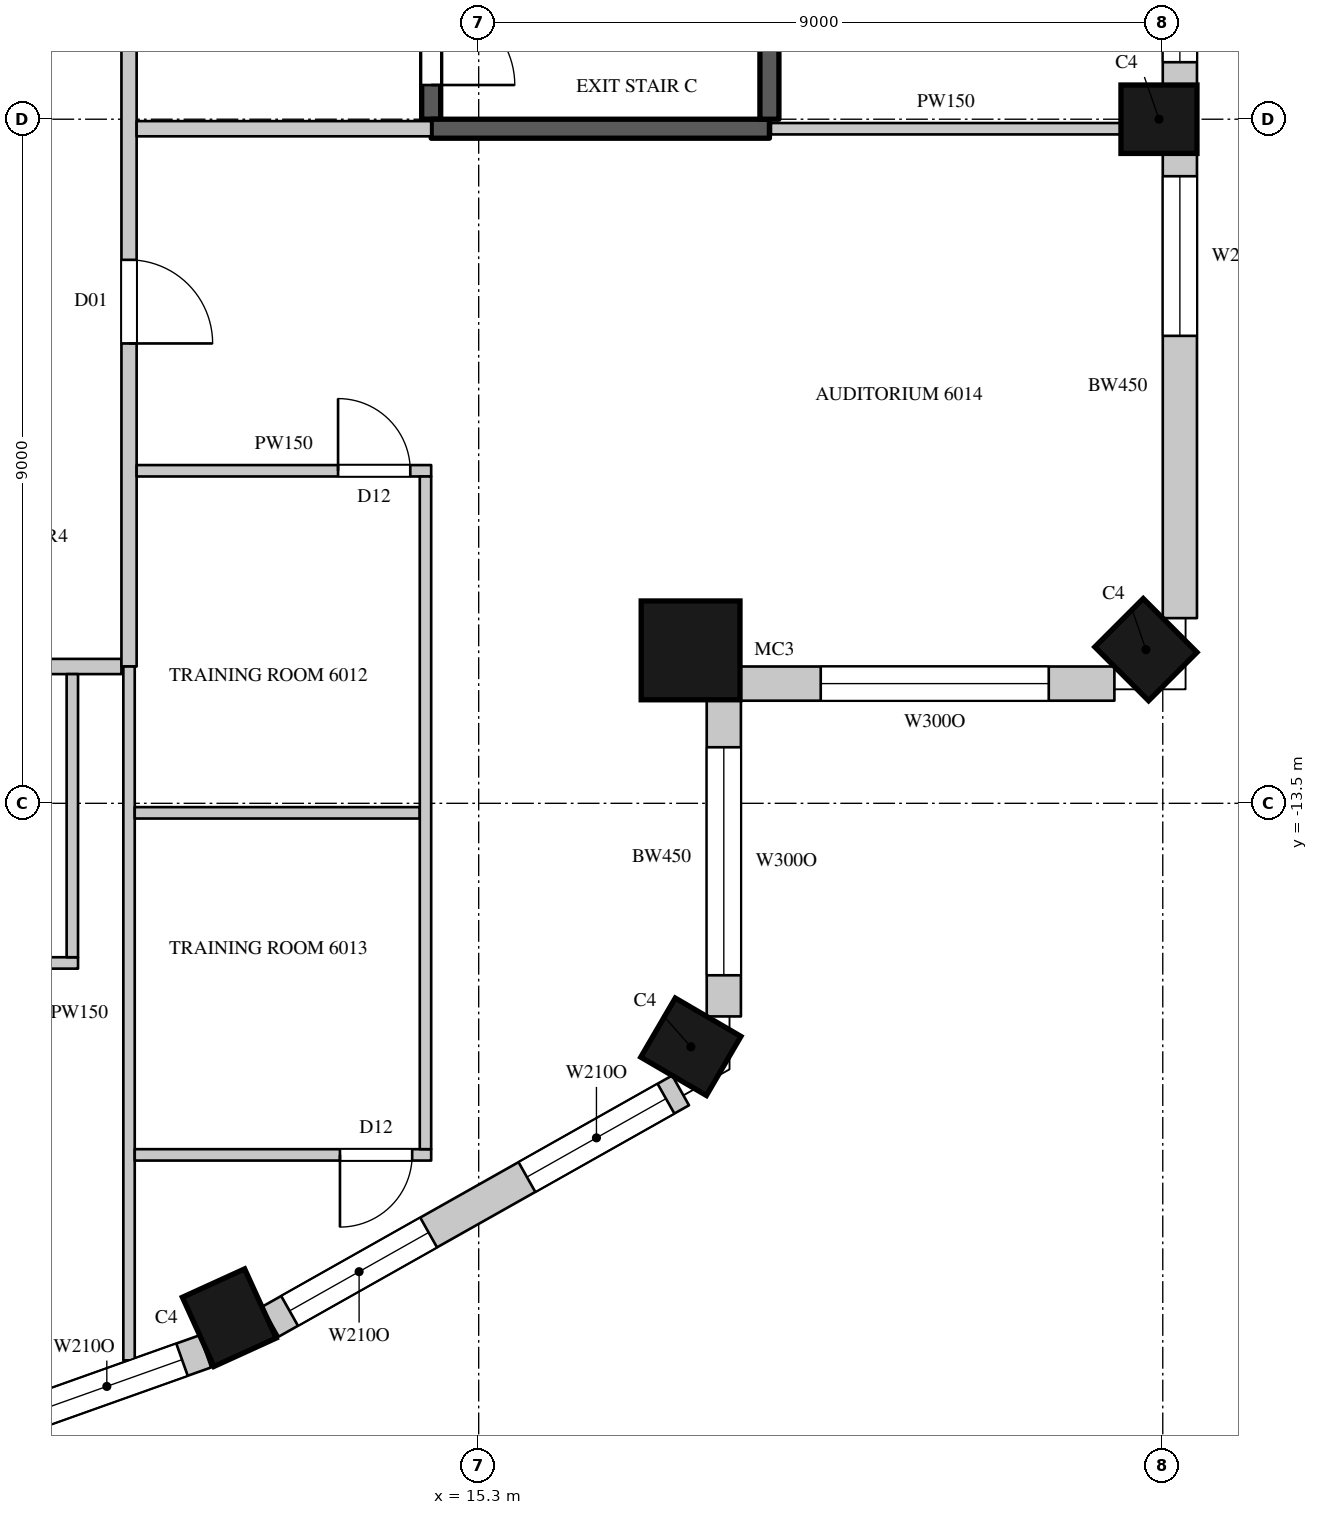
"""IFC4 building model, lengths in metres.
Left out: names, types, materials, properties, quantities, classifications, styles, units other than length and angle.
Written with IfcOpenShell. Run it as: python <this file> out.ifc"""

import sys

from ifc_helpers import new_model, si_unit, direction, frame, frame_2d, origin, origin_2d, place, context, subcontext, project, spatial, rectangle, circle, extrude, element, fill, save


model = new_model("IFC4")
c1 = context("Model", 3, precision=1e-05, world=origin(), true_north=direction((0.0, 1.0)))
c2 = subcontext(c1, "Body", "Model", "MODEL_VIEW")
j1 = project(units=[si_unit("LENGTHUNIT", "METRE"), si_unit("PLANEANGLEUNIT", "RADIAN")], contexts=[c1])
p1 = place(None, origin())
s1 = spatial("IfcSite", under=j1, at=p1, CompositionType="ELEMENT")
p2 = place(p1, origin())
s2 = spatial("IfcBuilding", under=s1, at=p2, CompositionType="ELEMENT")
p3 = place(p2, frame((0.0, 0.0, 268.0)))
s3 = spatial("IfcBuildingStorey", under=s2, at=p3, CompositionType="ELEMENT", Elevation=268.0)
for number, where, z_axis, x_axis in (
    (1, (12.019, -20.267, 0.0), (0.0, 0.0, 1.0), (0.91, 0.415, 0.0)),
    (2, (18.091, -16.703, 0.0), (0.0, 0.0, 1.0), (0.504, 0.863, 0.0)),
):
    element("IfcColumn", number, at=place(p3, frame(where, z_axis=z_axis, x_axis=x_axis)), inside=s3, PredefinedType="COLUMN", context=c2, shape_type="SweptSolid", body=[
        extrude(rectangle(XDim=0.9, YDim=1.0, at=origin_2d()), origin(), (0.0, 0.0, 1.0), 4.1),
    ])
p4 = place(p3, frame((18.088, -11.488, 0.0), z_axis=(0.0, 0.0, 1.0), x_axis=(1.0, 0.0, 0.0)))
e3 = element("IfcColumn", 3, at=p4, inside=s3, PredefinedType="COLUMN", context=c2, shape_type="SweptSolid", body=[
    extrude(circle(Radius=0.65, at=origin_2d()), origin(), (0.0, 0.0, 1.0), 4.1),
])
for number, where, z_axis, x_axis in (
    (4, (24.078, -11.478, 0.0), (0.0, 0.0, 1.0), (0.707, 0.707, 0.0)),
    (5, (24.25, -4.5, 0.0), (0.0, 0.0, 1.0), (0.0, 1.0, 0.0)),
):
    element("IfcColumn", number, at=place(p3, frame(where, z_axis=z_axis, x_axis=x_axis)), inside=s3, PredefinedType="COLUMN", context=c2, shape_type="SweptSolid", body=[
        extrude(rectangle(XDim=0.9, YDim=1.0, at=origin_2d()), origin(), (0.0, 0.0, 1.0), 4.1),
    ])
p5 = place(p3, frame((5.665, -22.859, 0.0), z_axis=(0.0, 0.0, 1.0), x_axis=(0.942108340262, 0.335308626803, 0.0)))
e6 = element("IfcWall", 6, at=p5, inside=s3, PredefinedType="SOLIDWALL", context=c2, shape_type="SweptSolid", body=[
    extrude(rectangle(XDim=6.412, YDim=0.45, at=frame_2d((3.206, 0.0))), origin(), (0.0, 0.0, 1.0), 3.8),
])
p6 = place(p5, frame((0.327, 0.0, 1.05)))
e7 = element("IfcOpeningElement", 7, at=p6, cuts=e6, PredefinedType="OPENING", context=c2, shape_type="SweptSolid", body=[
    extrude(rectangle(XDim=2.1, YDim=2.4, at=frame_2d((1.05, 1.2))), frame((0.0, 0.235, 0.0), z_axis=(0.0, -1.0, 0.0), x_axis=(1.0, 0.0, 0.0)), (0.0, 0.0, 1.0), 0.47),
])
p7 = place(p5, frame((3.985, 0.0, 1.05)))
e8 = element("IfcOpeningElement", 8, at=p7, cuts=e6, PredefinedType="OPENING", context=c2, shape_type="SweptSolid", body=[
    extrude(rectangle(XDim=2.1, YDim=2.4, at=frame_2d((1.05, 1.2))), frame((0.0, 0.235, 0.0), z_axis=(0.0, -1.0, 0.0), x_axis=(1.0, 0.0, 0.0)), (0.0, 0.0, 1.0), 0.47),
])
p8 = place(p3, frame((12.559, -20.32, 0.0), z_axis=(0.0, 0.0, 1.0), x_axis=(0.871065783524, 0.491166367714, 0.0)))
e9 = element("IfcWall", 9, at=p8, inside=s3, PredefinedType="SOLIDWALL", context=c2, shape_type="SweptSolid", body=[
    extrude(rectangle(XDim=6.196, YDim=0.45, at=frame_2d((3.098, 0.0))), origin(), (0.0, 0.0, 1.0), 3.8),
])
p9 = place(p8, frame((0.291, 0.0, 1.05)))
e10 = element("IfcOpeningElement", 10, at=p9, cuts=e9, PredefinedType="OPENING", context=c2, shape_type="SweptSolid", body=[
    extrude(rectangle(XDim=2.1, YDim=2.4, at=frame_2d((1.05, 1.2))), frame((0.0, 0.235, 0.0), z_axis=(0.0, -1.0, 0.0), x_axis=(1.0, 0.0, 0.0)), (0.0, 0.0, 1.0), 0.47),
])
p10 = place(p8, frame((3.875, 0.0, 1.05)))
e11 = element("IfcOpeningElement", 11, at=p10, cuts=e9, PredefinedType="OPENING", context=c2, shape_type="SweptSolid", body=[
    extrude(rectangle(XDim=2.1, YDim=2.4, at=frame_2d((1.05, 1.2))), frame((0.0, 0.235, 0.0), z_axis=(0.0, -1.0, 0.0), x_axis=(1.0, 0.0, 0.0)), (0.0, 0.0, 1.0), 0.47),
])
p11 = place(p3, frame((18.525, -16.304, 0.0), z_axis=(0.0, 0.0, 1.0), x_axis=(0.0, 1.0, 0.0)))
e12 = element("IfcWall", 12, at=p11, inside=s3, PredefinedType="SOLIDWALL", context=c2, shape_type="SweptSolid", body=[
    extrude(rectangle(XDim=4.202, YDim=0.45, at=frame_2d((2.101, 0.0))), origin(), (0.0, 0.0, 1.0), 3.8),
])
p12 = place(p11, frame((0.541, 0.0, 1.05)))
e13 = element("IfcOpeningElement", 13, at=p12, cuts=e12, PredefinedType="OPENING", context=c2, shape_type="SweptSolid", body=[
    extrude(rectangle(XDim=3.0, YDim=2.4, at=frame_2d((1.5, 1.2))), frame((0.0, 0.235, 0.0), z_axis=(0.0, -1.0, 0.0), x_axis=(1.0, 0.0, 0.0)), (0.0, 0.0, 1.0), 0.47),
])
p13 = place(p3, frame((18.701, -11.925, 0.0), z_axis=(0.0, 0.0, 1.0), x_axis=(1.0, 0.0, 0.0)))
e14 = element("IfcWall", 14, at=p13, inside=s3, PredefinedType="SOLIDWALL", context=c2, shape_type="SweptSolid", body=[
    extrude(rectangle(XDim=4.962, YDim=0.45, at=frame_2d((2.481, 0.0))), origin(), (0.0, 0.0, 1.0), 3.8),
])
p14 = place(p13, frame((1.098, 0.0, 1.05)))
e15 = element("IfcOpeningElement", 15, at=p14, cuts=e14, PredefinedType="OPENING", context=c2, shape_type="SweptSolid", body=[
    extrude(rectangle(XDim=3.0, YDim=2.4, at=frame_2d((1.5, 1.2))), frame((0.0, 0.235, 0.0), z_axis=(0.0, -1.0, 0.0), x_axis=(1.0, 0.0, 0.0)), (0.0, 0.0, 1.0), 0.47),
])
p15 = place(p3, frame((24.525, -11.064, 0.0), z_axis=(0.0, 0.0, 1.0), x_axis=(0.0, 1.0, 0.0)))
e16 = element("IfcWall", 16, at=p15, inside=s3, PredefinedType="SOLIDWALL", context=c2, shape_type="SweptSolid", body=[
    extrude(rectangle(XDim=6.114, YDim=0.45, at=frame_2d((3.057, 0.0))), origin(), (0.0, 0.0, 1.0), 3.8),
])
p16 = place(p15, frame((3.714, 0.0, 1.05)))
e17 = element("IfcOpeningElement", 17, at=p16, cuts=e16, PredefinedType="OPENING", context=c2, shape_type="SweptSolid", body=[
    extrude(rectangle(XDim=2.1, YDim=2.4, at=frame_2d((1.05, 1.2))), frame((0.0, 0.235, 0.0), z_axis=(0.0, -1.0, 0.0), x_axis=(1.0, 0.0, 0.0)), (0.0, 0.0, 1.0), 0.47),
])
p17 = place(p3, frame((24.525, -4.05, 0.0), z_axis=(0.0, 0.0, 1.0), x_axis=(0.0, 1.0, 0.0)))
e18 = element("IfcWall", 18, at=p17, inside=s3, PredefinedType="SOLIDWALL", context=c2, shape_type="SweptSolid", body=[
    extrude(rectangle(XDim=8.1, YDim=0.45, at=frame_2d((4.05, 0.0))), origin(), (0.0, 0.0, 1.0), 3.8),
])
p18 = place(p17, frame((0.3, 0.0, 1.05)))
e19 = element("IfcOpeningElement", 19, at=p18, cuts=e18, PredefinedType="OPENING", context=c2, shape_type="SweptSolid", body=[
    extrude(rectangle(XDim=3.0, YDim=2.4, at=frame_2d((1.5, 1.2))), frame((0.0, 0.235, 0.0), z_axis=(0.0, -1.0, 0.0), x_axis=(1.0, 0.0, 0.0)), (0.0, 0.0, 1.0), 0.47),
])
p19 = place(p17, frame((4.8, 0.0, 1.05)))
e20 = element("IfcOpeningElement", 20, at=p19, cuts=e18, PredefinedType="OPENING", context=c2, shape_type="SweptSolid", body=[
    extrude(rectangle(XDim=3.0, YDim=2.4, at=frame_2d((1.5, 1.2))), frame((0.0, 0.235, 0.0), z_axis=(0.0, -1.0, 0.0), x_axis=(1.0, 0.0, 0.0)), (0.0, 0.0, 1.0), 0.47),
])
p20 = place(p3, frame((-10.9, -11.7, 0.0), z_axis=(0.0, 0.0, 1.0), x_axis=(1.0, 0.0, 0.0)))
e21 = element("IfcWall", 21, at=p20, inside=s3, PredefinedType="PARTITIONING", context=c2, shape_type="SweptSolid", body=[
    extrude(rectangle(XDim=21.5, YDim=0.2, at=frame_2d((10.75, 0.0))), origin(), (0.0, 0.0, 1.0), 3.8),
])
p21 = place(p20, frame((0.95, 0.0, 0.0)))
e22 = element("IfcOpeningElement", 22, at=p21, cuts=e21, PredefinedType="OPENING", context=c2, shape_type="SweptSolid", body=[
    extrude(rectangle(XDim=0.95, YDim=2.2, at=frame_2d((0.475, 1.1))), frame((0.0, 0.11, 0.0), z_axis=(0.0, -1.0, 0.0), x_axis=(1.0, 0.0, 0.0)), (0.0, 0.0, 1.0), 0.22),
])
p22 = place(p20, frame((4.2, 0.0, 0.0)))
e23 = element("IfcOpeningElement", 23, at=p22, cuts=e21, PredefinedType="OPENING", context=c2, shape_type="SweptSolid", body=[
    extrude(rectangle(XDim=0.9, YDim=2.2, at=frame_2d((0.45, 1.1))), frame((0.0, 0.11, 0.0), z_axis=(0.0, -1.0, 0.0), x_axis=(1.0, 0.0, 0.0)), (0.0, 0.0, 1.0), 0.22),
])
p23 = place(p20, frame((6.85, 0.0, 0.0)))
e24 = element("IfcOpeningElement", 24, at=p23, cuts=e21, PredefinedType="OPENING", context=c2, shape_type="SweptSolid", body=[
    extrude(rectangle(XDim=1.1, YDim=2.4, at=frame_2d((0.55, 1.2))), frame((0.0, 0.11, 0.0), z_axis=(0.0, -1.0, 0.0), x_axis=(1.0, 0.0, 0.0)), (0.0, 0.0, 1.0), 0.22),
])
p24 = place(p20, frame((9.95, 0.0, 0.0)))
e25 = element("IfcOpeningElement", 25, at=p24, cuts=e21, PredefinedType="OPENING", context=c2, shape_type="SweptSolid", body=[
    extrude(rectangle(XDim=1.1, YDim=2.4, at=frame_2d((0.55, 1.2))), frame((0.0, 0.11, 0.0), z_axis=(0.0, -1.0, 0.0), x_axis=(1.0, 0.0, 0.0)), (0.0, 0.0, 1.0), 0.22),
])
p25 = place(p3, frame((10.7, -11.7, 0.0), z_axis=(0.0, 0.0, 1.0), x_axis=(0.0, 1.0, 0.0)))
e26 = element("IfcWall", 26, at=p25, inside=s3, PredefinedType="PARTITIONING", context=c2, shape_type="SweptSolid", body=[
    extrude(rectangle(XDim=23.8, YDim=0.2, at=frame_2d((11.9, 0.0))), origin(), (0.0, 0.0, 1.0), 3.8),
])
p26 = place(p25, frame((12.35, 0.0, 0.0)))
e27 = element("IfcOpeningElement", 27, at=p26, cuts=e26, PredefinedType="OPENING", context=c2, shape_type="SweptSolid", body=[
    extrude(rectangle(XDim=1.5, YDim=2.4, at=frame_2d((0.75, 1.2))), frame((0.0, 0.11, 0.0), z_axis=(0.0, -1.0, 0.0), x_axis=(1.0, 0.0, 0.0)), (0.0, 0.0, 1.0), 0.22),
])
p27 = place(p25, frame((19.55, 0.0, 0.0)))
e28 = element("IfcOpeningElement", 28, at=p27, cuts=e26, PredefinedType="OPENING", context=c2, shape_type="SweptSolid", body=[
    extrude(rectangle(XDim=1.1, YDim=2.4, at=frame_2d((0.55, 1.2))), frame((0.0, 0.11, 0.0), z_axis=(0.0, -1.0, 0.0), x_axis=(1.0, 0.0, 0.0)), (0.0, 0.0, 1.0), 0.22),
])
p28 = place(p25, frame((4.25, 0.0, 0.0)))
e29 = element("IfcOpeningElement", 29, at=p28, cuts=e26, PredefinedType="OPENING", context=c2, shape_type="SweptSolid", body=[
    extrude(rectangle(XDim=1.1, YDim=2.4, at=frame_2d((0.55, 1.2))), frame((0.0, 0.11, 0.0), z_axis=(0.0, -1.0, 0.0), x_axis=(1.0, 0.0, 0.0)), (0.0, 0.0, 1.0), 0.22),
])
p29 = place(p3, frame((10.8, -4.625, 0.0), z_axis=(0.0, 0.0, 1.0), x_axis=(1.0, 0.0, 0.0)))
e30 = element("IfcWall", 30, at=p29, inside=s3, PredefinedType="PARTITIONING", context=c2, shape_type="SweptSolid", body=[
    extrude(rectangle(XDim=3.875, YDim=0.2, at=frame_2d((1.938, 0.0))), origin(), (0.0, 0.0, 1.0), 3.8),
])
p30 = place(p3, frame((2.379, -15.6, 0.0), z_axis=(0.0, 0.0, 1.0), x_axis=(1.0, 0.0, 0.0)))
e31 = element("IfcWall", 31, at=p30, inside=s3, PredefinedType="PARTITIONING", context=c2, shape_type="SweptSolid", body=[
    extrude(rectangle(XDim=7.65, YDim=0.15, at=frame_2d((3.825, 0.0))), origin(), (0.0, 0.0, 1.0), 3.8),
])
p31 = place(p30, frame((4.85, 0.0, 0.0)))
e32 = element("IfcOpeningElement", 32, at=p31, cuts=e31, PredefinedType="OPENING", context=c2, shape_type="SweptSolid", body=[
    extrude(rectangle(XDim=0.95, YDim=2.2, at=frame_2d((0.475, 1.1))), frame((0.0, 0.085, 0.0), z_axis=(0.0, -1.0, 0.0), x_axis=(1.0, 0.0, 0.0)), (0.0, 0.0, 1.0), 0.17),
])
p32 = place(p3, frame((9.954, -15.525, 0.0), z_axis=(0.0, 0.0, 1.0), x_axis=(0.0, 1.0, 0.0)))
e33 = element("IfcWall", 33, at=p32, inside=s3, PredefinedType="PARTITIONING", context=c2, shape_type="SweptSolid", body=[
    extrude(rectangle(XDim=3.725, YDim=0.15, at=frame_2d((1.862, 0.0))), origin(), (0.0, 0.0, 1.0), 3.8),
])
p33 = place(p3, frame((10.7, -20.828, 0.0), z_axis=(0.0, 0.0, 1.0), x_axis=(0.0, 1.0, 0.0)))
e34 = element("IfcWall", 34, at=p33, inside=s3, PredefinedType="PARTITIONING", context=c2, shape_type="SweptSolid", body=[
    extrude(rectangle(XDim=9.128, YDim=0.15, at=frame_2d((4.564, 0.0))), origin(), (0.0, 0.0, 1.0), 3.8),
])
p34 = place(p3, frame((10.775, -18.125, 0.0), z_axis=(0.0, 0.0, 1.0), x_axis=(1.0, 0.0, 0.0)))
e35 = element("IfcWall", 35, at=p34, inside=s3, PredefinedType="PARTITIONING", context=c2, shape_type="SweptSolid", body=[
    extrude(rectangle(XDim=3.9, YDim=0.15, at=frame_2d((1.95, 0.0))), origin(), (0.0, 0.0, 1.0), 3.8),
])
p35 = place(p34, frame((2.7, 0.0, 0.0)))
e36 = element("IfcOpeningElement", 36, at=p35, cuts=e35, PredefinedType="OPENING", context=c2, shape_type="SweptSolid", body=[
    extrude(rectangle(XDim=0.95, YDim=2.2, at=frame_2d((0.475, 1.1))), frame((0.0, 0.085, 0.0), z_axis=(0.0, -1.0, 0.0), x_axis=(1.0, 0.0, 0.0)), (0.0, 0.0, 1.0), 0.17),
])
p36 = place(p3, frame((10.775, -13.625, 0.0), z_axis=(0.0, 0.0, 1.0), x_axis=(1.0, 0.0, 0.0)))
e37 = element("IfcWall", 37, at=p36, inside=s3, PredefinedType="PARTITIONING", context=c2, shape_type="SweptSolid", body=[
    extrude(rectangle(XDim=3.75, YDim=0.15, at=frame_2d((1.875, 0.0))), origin(), (0.0, 0.0, 1.0), 3.8),
])
p37 = place(p3, frame((10.8, -9.125, 0.0), z_axis=(0.0, 0.0, 1.0), x_axis=(1.0, 0.0, 0.0)))
e38 = element("IfcWall", 38, at=p37, inside=s3, PredefinedType="PARTITIONING", context=c2, shape_type="SweptSolid", body=[
    extrude(rectangle(XDim=3.875, YDim=0.15, at=frame_2d((1.938, 0.0))), origin(), (0.0, 0.0, 1.0), 3.8),
])
p38 = place(p37, frame((2.65, 0.0, 0.0)))
e39 = element("IfcOpeningElement", 39, at=p38, cuts=e38, PredefinedType="OPENING", context=c2, shape_type="SweptSolid", body=[
    extrude(rectangle(XDim=0.95, YDim=2.2, at=frame_2d((0.475, 1.1))), frame((0.0, 0.085, 0.0), z_axis=(0.0, -1.0, 0.0), x_axis=(1.0, 0.0, 0.0)), (0.0, 0.0, 1.0), 0.17),
])
p39 = place(p3, frame((14.6, -18.05, 0.0), z_axis=(0.0, 0.0, 1.0), x_axis=(0.0, 1.0, 0.0)))
e40 = element("IfcWall", 40, at=p39, inside=s3, PredefinedType="PARTITIONING", context=c2, shape_type="SweptSolid", body=[
    extrude(rectangle(XDim=8.85, YDim=0.15, at=frame_2d((4.425, 0.0))), origin(), (0.0, 0.0, 1.0), 3.8),
])
p40 = place(p3, frame((19.145, -4.625, 0.0), z_axis=(0.0, 0.0, 1.0), x_axis=(1.0, 0.0, 0.0)))
e41 = element("IfcWall", 41, at=p40, inside=s3, PredefinedType="PARTITIONING", context=c2, shape_type="SweptSolid", body=[
    extrude(rectangle(XDim=4.605, YDim=0.15, at=frame_2d((2.302, 0.0))), origin(), (0.0, 0.0, 1.0), 3.8),
])
p41 = place(p3, frame((14.675, -4.5, 0.0), z_axis=(0.0, 0.0, 1.0), x_axis=(0.0, 1.0, 0.0)))
e42 = element("IfcWall", 42, at=p41, inside=s3, PredefinedType="SHEAR", context=c2, shape_type="SweptSolid", body=[
    extrude(rectangle(XDim=9.0, YDim=0.25, at=frame_2d((4.5, 0.0))), origin(), (0.0, 0.0, 1.0), 3.8),
])
p42 = place(p41, frame((0.45, 0.0, 0.0)))
e43 = element("IfcOpeningElement", 43, at=p42, cuts=e42, PredefinedType="OPENING", context=c2, shape_type="SweptSolid", body=[
    extrude(rectangle(XDim=1.1, YDim=2.2, at=frame_2d((0.55, 1.1))), frame((0.0, 0.135, 0.0), z_axis=(0.0, -1.0, 0.0), x_axis=(1.0, 0.0, 0.0)), (0.0, 0.0, 1.0), 0.27),
])
p43 = place(p3, frame((14.675, -4.625, 0.0), z_axis=(0.0, 0.0, 1.0), x_axis=(1.0, 0.0, 0.0)))
e44 = element("IfcWall", 44, at=p43, inside=s3, PredefinedType="SHEAR", context=c2, shape_type="SweptSolid", body=[
    extrude(rectangle(XDim=4.45, YDim=0.25, at=frame_2d((2.225, 0.0))), origin(), (0.0, 0.0, 1.0), 3.8),
])
p44 = place(p3, frame((19.125, -4.5, 0.0), z_axis=(0.0, 0.0, 1.0), x_axis=(0.0, 1.0, 0.0)))
e45 = element("IfcWall", 45, at=p44, inside=s3, PredefinedType="SHEAR", context=c2, shape_type="SweptSolid", body=[
    extrude(rectangle(XDim=9.0, YDim=0.25, at=frame_2d((4.5, 0.0))), origin(), (0.0, 0.0, 1.0), 3.8),
])
p45 = place(p7, origin())
e46 = element("IfcWindow", 46, at=p45, inside=s3, PartitioningType="SINGLE_PANEL", PredefinedType="WINDOW", context=c2, shape_type="SweptSolid", body=[
    extrude(rectangle(XDim=2.1, YDim=2.4, at=frame_2d((1.05, 1.2))), frame((0.0, 0.135, 0.0), z_axis=(0.0, -1.0, 0.0), x_axis=(1.0, 0.0, 0.0)), (0.0, 0.0, 1.0), 0.06),
])
fill(e8, e46)
p46 = place(p9, origin())
e47 = element("IfcWindow", 47, at=p46, inside=s3, PartitioningType="SINGLE_PANEL", PredefinedType="WINDOW", context=c2, shape_type="SweptSolid", body=[
    extrude(rectangle(XDim=2.1, YDim=2.4, at=frame_2d((1.05, 1.2))), frame((0.0, 0.135, 0.0), z_axis=(0.0, -1.0, 0.0), x_axis=(1.0, 0.0, 0.0)), (0.0, 0.0, 1.0), 0.06),
])
fill(e10, e47)
p47 = place(p10, origin())
e48 = element("IfcWindow", 48, at=p47, inside=s3, PartitioningType="SINGLE_PANEL", PredefinedType="WINDOW", context=c2, shape_type="SweptSolid", body=[
    extrude(rectangle(XDim=2.1, YDim=2.4, at=frame_2d((1.05, 1.2))), frame((0.0, 0.135, 0.0), z_axis=(0.0, -1.0, 0.0), x_axis=(1.0, 0.0, 0.0)), (0.0, 0.0, 1.0), 0.06),
])
fill(e11, e48)
p48 = place(p12, origin())
e49 = element("IfcWindow", 49, at=p48, inside=s3, PartitioningType="SINGLE_PANEL", PredefinedType="WINDOW", context=c2, shape_type="SweptSolid", body=[
    extrude(rectangle(XDim=3.0, YDim=2.4, at=frame_2d((1.5, 1.2))), frame((0.0, 0.135, 0.0), z_axis=(0.0, -1.0, 0.0), x_axis=(1.0, 0.0, 0.0)), (0.0, 0.0, 1.0), 0.06),
])
fill(e13, e49)
p49 = place(p14, origin())
e50 = element("IfcWindow", 50, at=p49, inside=s3, PartitioningType="SINGLE_PANEL", PredefinedType="WINDOW", context=c2, shape_type="SweptSolid", body=[
    extrude(rectangle(XDim=3.0, YDim=2.4, at=frame_2d((1.5, 1.2))), frame((0.0, 0.135, 0.0), z_axis=(0.0, -1.0, 0.0), x_axis=(1.0, 0.0, 0.0)), (0.0, 0.0, 1.0), 0.06),
])
fill(e15, e50)
p50 = place(p16, origin())
e51 = element("IfcWindow", 51, at=p50, inside=s3, PartitioningType="SINGLE_PANEL", PredefinedType="WINDOW", context=c2, shape_type="SweptSolid", body=[
    extrude(rectangle(XDim=2.1, YDim=2.4, at=frame_2d((1.05, 1.2))), frame((0.0, 0.135, 0.0), z_axis=(0.0, -1.0, 0.0), x_axis=(1.0, 0.0, 0.0)), (0.0, 0.0, 1.0), 0.06),
])
fill(e17, e51)
p51 = place(p18, origin())
e52 = element("IfcWindow", 52, at=p51, inside=s3, PartitioningType="SINGLE_PANEL", PredefinedType="WINDOW", context=c2, shape_type="SweptSolid", body=[
    extrude(rectangle(XDim=3.0, YDim=2.4, at=frame_2d((1.5, 1.2))), frame((0.0, 0.135, 0.0), z_axis=(0.0, -1.0, 0.0), x_axis=(1.0, 0.0, 0.0)), (0.0, 0.0, 1.0), 0.06),
])
fill(e19, e52)
p52 = place(p28, origin())
e53 = element("IfcDoor", 53, at=p52, inside=s3, OperationType="SINGLE_SWING_RIGHT", PredefinedType="DOOR", context=c2, shape_type="SweptSolid", body=[
    extrude(rectangle(XDim=1.1, YDim=2.4, at=frame_2d((0.55, 1.2))), frame((0.0, 0.025, 0.0), z_axis=(0.0, -1.0, 0.0), x_axis=(1.0, 0.0, 0.0)), (0.0, 0.0, 1.0), 0.05),
])
fill(e29, e53)
p53 = place(p38, origin())
e54 = element("IfcDoor", 54, at=p53, inside=s3, OperationType="SINGLE_SWING_LEFT", PredefinedType="DOOR", context=c2, shape_type="SweptSolid", body=[
    extrude(rectangle(XDim=0.95, YDim=2.2, at=frame_2d((0.475, 1.1))), frame((0.0, 0.025, 0.0), z_axis=(0.0, -1.0, 0.0), x_axis=(1.0, 0.0, 0.0)), (0.0, 0.0, 1.0), 0.05),
])
fill(e39, e54)
p54 = place(p35, origin())
e55 = element("IfcDoor", 55, at=p54, inside=s3, OperationType="SINGLE_SWING_RIGHT", PredefinedType="DOOR", context=c2, shape_type="SweptSolid", body=[
    extrude(rectangle(XDim=0.95, YDim=2.2, at=frame_2d((0.475, 1.1))), frame((0.0, 0.025, 0.0), z_axis=(0.0, -1.0, 0.0), x_axis=(1.0, 0.0, 0.0)), (0.0, 0.0, 1.0), 0.05),
])
fill(e36, e55)
p55 = place(p42, origin())
e56 = element("IfcDoor", 56, at=p55, inside=s3, OperationType="SINGLE_SWING_RIGHT", PredefinedType="DOOR", context=c2, shape_type="SweptSolid", body=[
    extrude(rectangle(XDim=1.1, YDim=2.2, at=frame_2d((0.55, 1.1))), frame((0.0, 0.025, 0.0), z_axis=(0.0, -1.0, 0.0), x_axis=(1.0, 0.0, 0.0)), (0.0, 0.0, 1.0), 0.05),
])
fill(e43, e56)
save(model, sys.argv[1])
